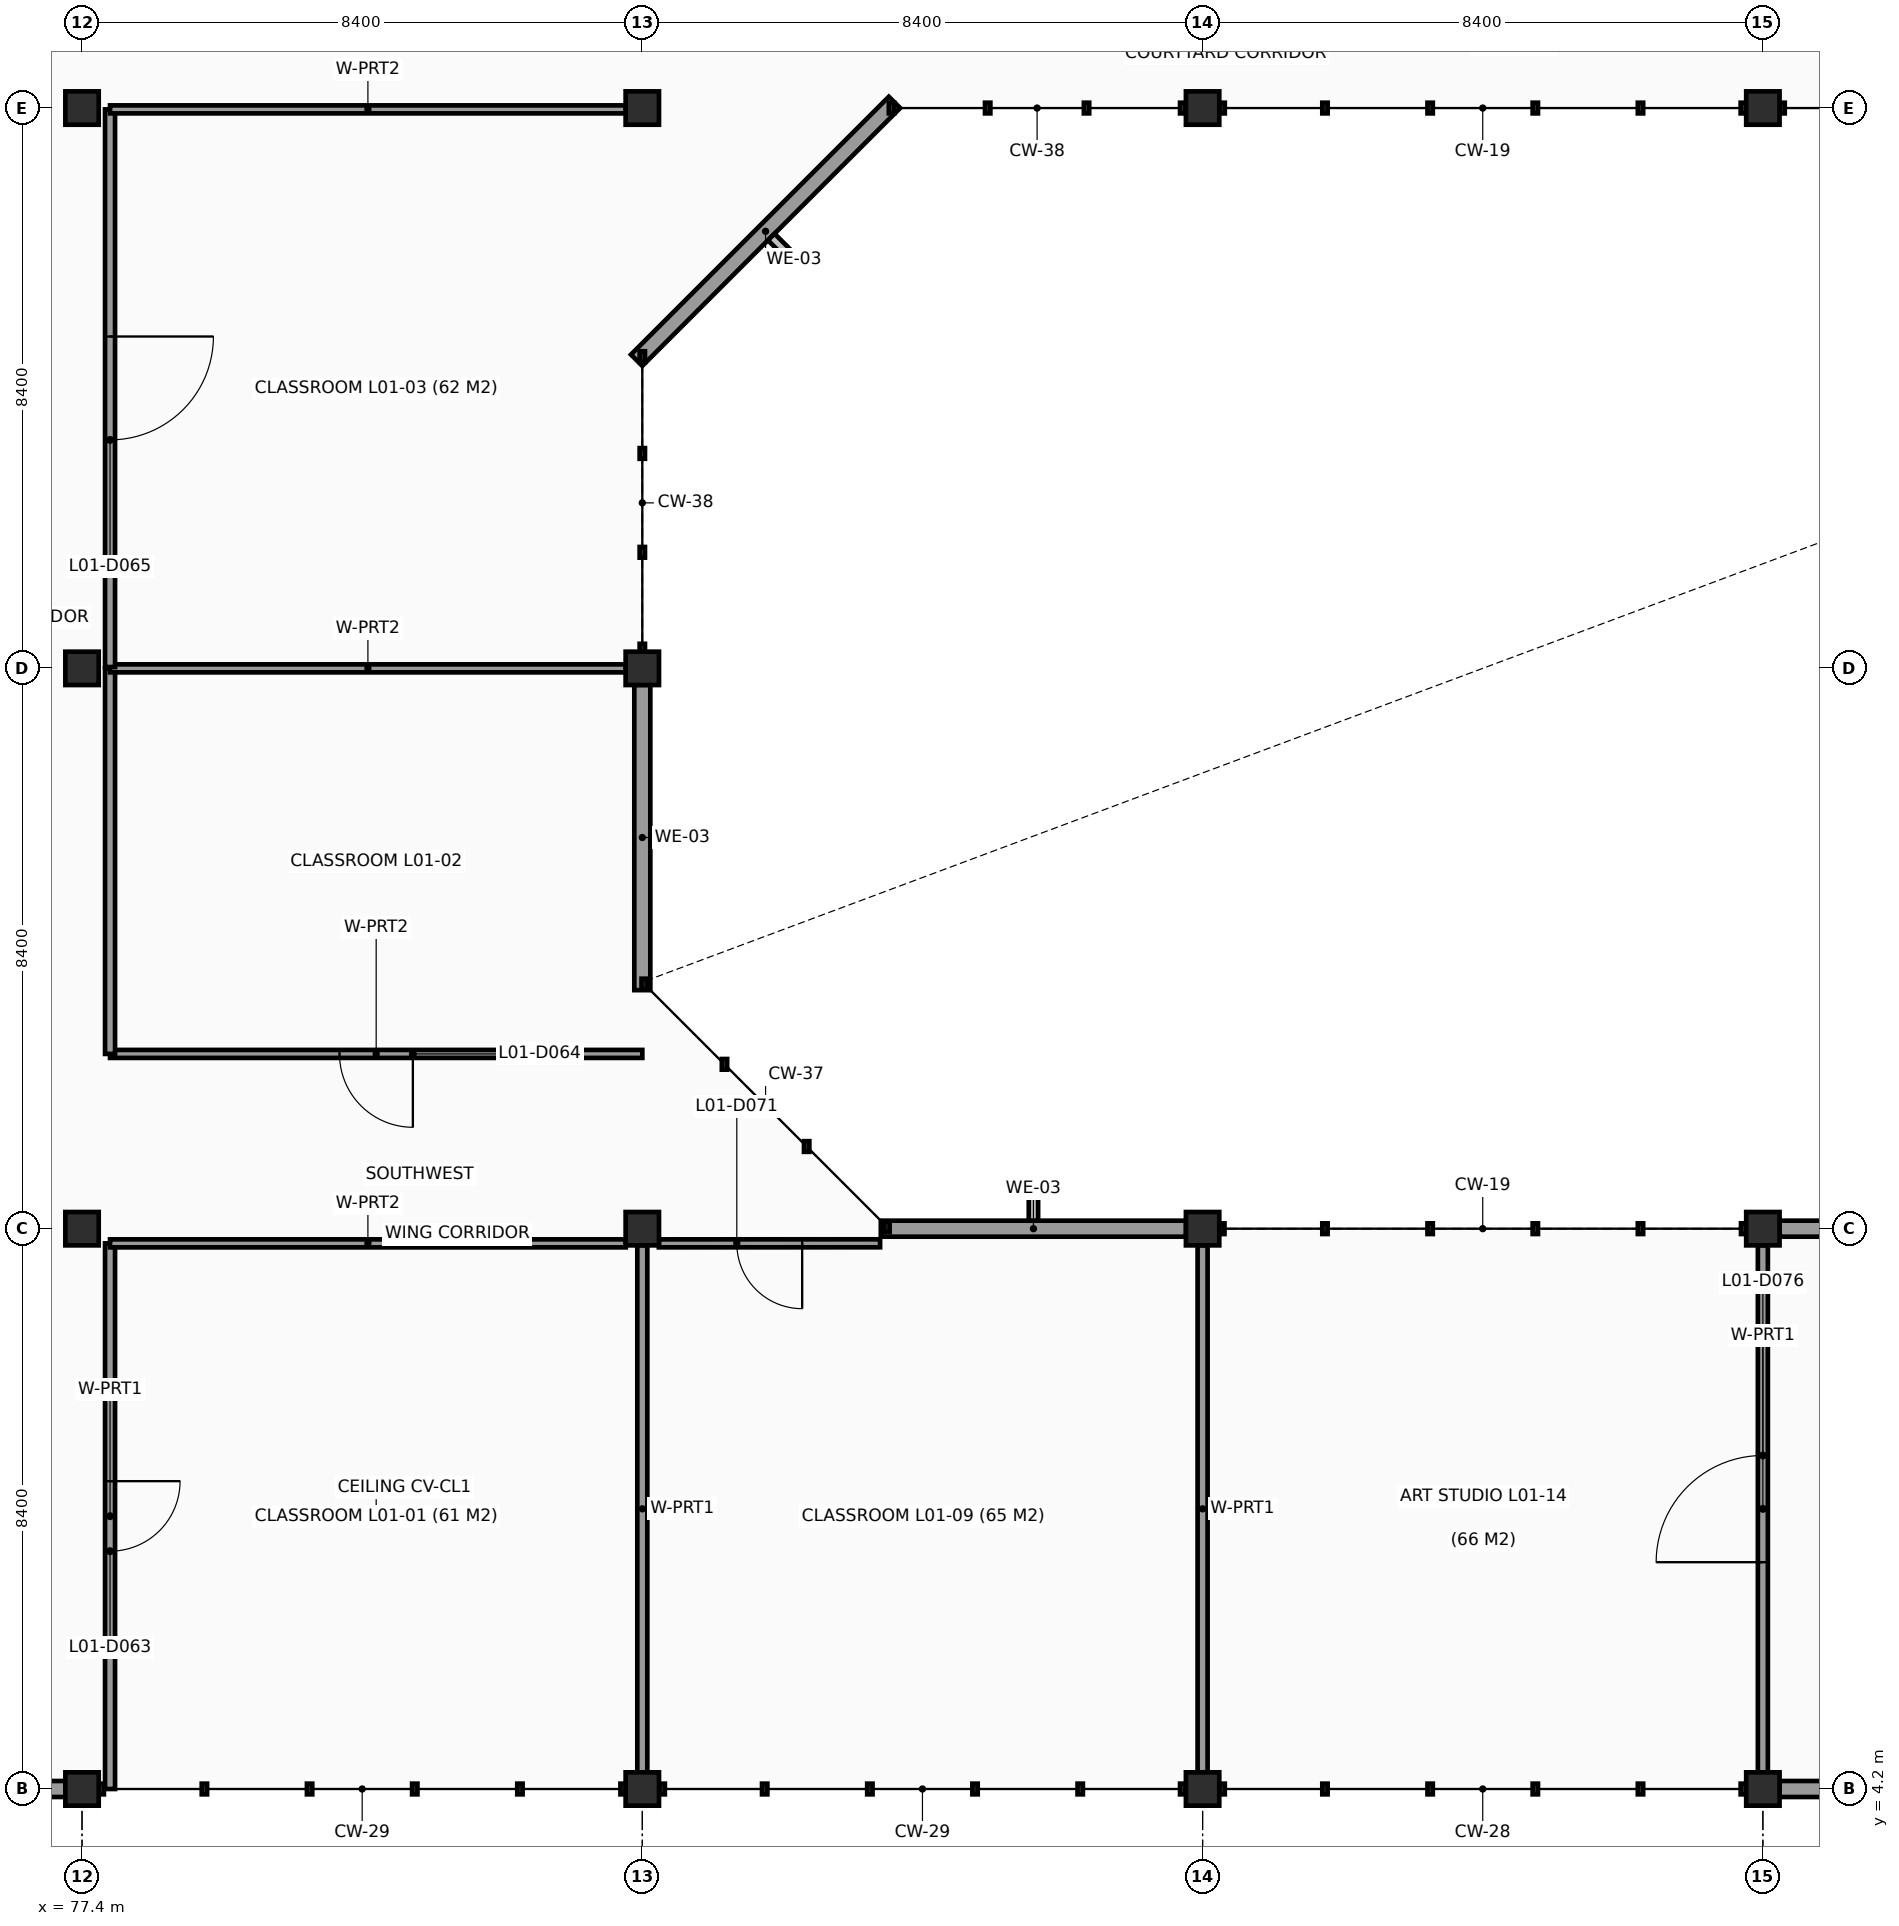
"""IFC4 building model, lengths in metres.
Left out: names, types, materials, properties, quantities, classifications, styles, units other than length and angle.
Written with IfcOpenShell. Run it as: python <this file> out.ifc"""

import sys

from ifc_helpers import new_model, si_unit, direction, frame, frame_2d, origin, origin_2d, place, context, subcontext, project, spatial, rectangle, extrude, element, fill, save


model = new_model("IFC4")
c1 = context("Model", 3, precision=1e-05, world=origin(), true_north=direction((0.0, 1.0)))
c2 = subcontext(c1, "Body", "Model", "MODEL_VIEW")
j1 = project(units=[si_unit("LENGTHUNIT", "METRE"), si_unit("PLANEANGLEUNIT", "RADIAN")], contexts=[c1])
p1 = place(None, origin())
s1 = spatial("IfcSite", under=j1, at=p1, CompositionType="ELEMENT")
p2 = place(p1, origin())
s2 = spatial("IfcBuilding", under=s1, at=p2, CompositionType="ELEMENT")
p3 = place(p2, frame((0.0, 0.0, 4.2)))
s3 = spatial("IfcBuildingStorey", under=s2, at=p3, CompositionType="ELEMENT", Elevation=4.2)
for number, where, z_axis, x_axis in (
    (1, (77.4, 4.2, 0.0), (0.0, 0.0, 1.0), (1.0, 0.0, 0.0)),
    (2, (77.4, 12.6, 0.0), (0.0, 0.0, 1.0), (1.0, 0.0, 0.0)),
    (3, (77.4, 21.0, 0.0), (0.0, 0.0, 1.0), (1.0, 0.0, 0.0)),
    (4, (77.4, 29.4, 0.0), (0.0, 0.0, 1.0), (1.0, 0.0, 0.0)),
    (5, (85.8, 4.2, 0.0), (0.0, 0.0, 1.0), (1.0, 0.0, 0.0)),
    (6, (85.8, 12.6, 0.0), (0.0, 0.0, 1.0), (1.0, 0.0, 0.0)),
    (7, (85.8, 21.0, 0.0), (0.0, 0.0, 1.0), (1.0, 0.0, 0.0)),
    (8, (85.8, 29.4, 0.0), (0.0, 0.0, 1.0), (1.0, 0.0, 0.0)),
    (9, (94.2, 4.2, 0.0), (0.0, 0.0, 1.0), (1.0, 0.0, 0.0)),
    (10, (94.2, 12.6, 0.0), (0.0, 0.0, 1.0), (1.0, 0.0, 0.0)),
    (11, (94.2, 29.4, 0.0), (0.0, 0.0, 1.0), (1.0, 0.0, 0.0)),
    (12, (102.6, 4.2, 0.0), (0.0, 0.0, 1.0), (1.0, 0.0, 0.0)),
    (13, (102.6, 12.6, 0.0), (0.0, 0.0, 1.0), (1.0, 0.0, 0.0)),
    (14, (102.6, 29.4, 0.0), (0.0, 0.0, 1.0), (1.0, 0.0, 0.0)),
):
    element("IfcColumn", number, at=place(p3, frame(where, z_axis=z_axis, x_axis=x_axis)), inside=s3, PredefinedType="COLUMN", context=c2, shape_type="SweptSolid", body=[
        extrude(rectangle(XDim=0.5, YDim=0.5, at=origin_2d()), origin(), (0.0, 0.0, 1.0), 3.6),
    ])
p4 = place(p3, frame((109.552, 4.2, 0.0), z_axis=(0.0, 0.0, 1.0), x_axis=(-1.0, 0.0, 0.0)))
e15 = element("IfcWall", 15, at=p4, inside=s3, PredefinedType="SOLIDWALL", context=c2, shape_type="SweptSolid", body=[
    extrude(rectangle(XDim=6.704, YDim=0.24, at=frame_2d((3.352, 0.0))), origin(), (0.0, 0.0, 1.0), 2.83),
])
p5 = place(p3, frame((77.152, 4.2, 0.0), z_axis=(0.0, 0.0, 1.0), x_axis=(-1.0, 0.0, 0.0)))
e16 = element("IfcWall", 16, at=p5, inside=s3, PredefinedType="SOLIDWALL", context=c2, shape_type="SweptSolid", body=[
    extrude(rectangle(XDim=2.504, YDim=0.24, at=frame_2d((1.252, 0.0))), origin(), (0.0, 0.0, 1.0), 2.77),
])
p6 = place(p5, frame((0.652, 0.0, 0.95)))
e17 = element("IfcOpeningElement", 17, at=p6, cuts=e16, PredefinedType="OPENING", context=c2, shape_type="SweptSolid", body=[
    extrude(rectangle(XDim=1.2, YDim=1.2, at=frame_2d((0.6, 0.6))), frame((0.0, 0.13, 0.0), z_axis=(0.0, -1.0, 0.0), x_axis=(1.0, 0.0, 0.0)), (0.0, 0.0, 1.0), 0.26),
])
p7 = place(p3, frame((89.376, 12.6, 0.0), z_axis=(0.0, 0.0, 1.0), x_axis=(1.0, 0.0, 0.0)))
e18 = element("IfcWall", 18, at=p7, inside=s3, PredefinedType="SOLIDWALL", context=c2, shape_type="SweptSolid", body=[
    extrude(rectangle(XDim=4.576, YDim=0.24, at=frame_2d((2.288, 0.0))), origin(), (0.0, 0.0, 1.0), 2.62),
])
p8 = place(p3, frame((102.848, 12.6, 0.0), z_axis=(0.0, 0.0, 1.0), x_axis=(1.0, 0.0, 0.0)))
e19 = element("IfcWall", 19, at=p8, inside=s3, PredefinedType="SOLIDWALL", context=c2, shape_type="SweptSolid", body=[
    extrude(rectangle(XDim=4.576, YDim=0.24, at=frame_2d((2.288, 0.0))), origin(), (0.0, 0.0, 1.0), 2.58),
])
p9 = place(p3, frame((89.581, 29.485, 0.0), z_axis=(0.0, 0.0, 1.0), x_axis=(-0.707106781187, -0.707106781187, 0.0)))
e20 = element("IfcWall", 20, at=p9, inside=s3, PredefinedType="SOLIDWALL", context=c2, shape_type="SweptSolid", body=[
    extrude(rectangle(XDim=5.467, YDim=0.24, at=frame_2d((2.733, 0.0))), origin(), (0.0, 0.0, 1.0), 2.58),
])
p10 = place(p3, frame((85.8, 20.752, 0.0), z_axis=(0.0, 0.0, 1.0), x_axis=(0.0, -1.0, 0.0)))
e21 = element("IfcWall", 21, at=p10, inside=s3, PredefinedType="SOLIDWALL", context=c2, shape_type="SweptSolid", body=[
    extrude(rectangle(XDim=4.576, YDim=0.24, at=frame_2d((2.288, 0.0))), origin(), (0.0, 0.0, 1.0), 2.58),
])
p11 = place(p3, frame((77.82, 4.2, 0.0), z_axis=(0.0, 0.0, 1.0), x_axis=(0.0, 1.0, 0.0)))
e22 = element("IfcWall", 22, at=p11, inside=s3, PredefinedType="PARTITIONING", context=c2, shape_type="SweptSolid", body=[
    extrude(rectangle(XDim=8.18, YDim=0.15, at=frame_2d((4.09, 0.0))), origin(), (0.0, 0.0, 1.0), 2.87),
])
p12 = place(p11, frame((3.565, 0.0, 0.0)))
e23 = element("IfcOpeningElement", 23, at=p12, cuts=e22, PredefinedType="OPENING", context=c2, shape_type="SweptSolid", body=[
    extrude(rectangle(XDim=1.05, YDim=2.15, at=frame_2d((0.525, 1.075))), frame((0.0, 0.085, 0.0), z_axis=(0.0, -1.0, 0.0), x_axis=(1.0, 0.0, 0.0)), (0.0, 0.0, 1.0), 0.17),
])
p13 = place(p3, frame((77.82, 12.38, 0.0), z_axis=(0.0, 0.0, 1.0), x_axis=(1.0, 0.0, 0.0)))
e24 = element("IfcWall", 24, at=p13, inside=s3, PredefinedType="PARTITIONING", context=c2, shape_type="SweptSolid", body=[
    extrude(rectangle(XDim=7.732, YDim=0.12, at=frame_2d((3.866, 0.0))), origin(), (0.0, 0.0, 1.0), 2.93),
])
p14 = place(p3, frame((85.8, 12.352, 0.0), z_axis=(0.0, 0.0, 1.0), x_axis=(0.0, -1.0, 0.0)))
e25 = element("IfcWall", 25, at=p14, inside=s3, PredefinedType="PARTITIONING", context=c2, shape_type="SweptSolid", body=[
    extrude(rectangle(XDim=7.904, YDim=0.15, at=frame_2d((3.952, 0.0))), origin(), (0.0, 0.0, 1.0), 2.92),
])
p15 = place(p3, frame((85.8, 15.22, 0.0), z_axis=(0.0, 0.0, 1.0), x_axis=(-1.0, 0.0, 0.0)))
e26 = element("IfcWall", 26, at=p15, inside=s3, PredefinedType="PARTITIONING", context=c2, shape_type="SweptSolid", body=[
    extrude(rectangle(XDim=7.98, YDim=0.12, at=frame_2d((3.99, 0.0))), origin(), (0.0, 0.0, 1.0), 2.58),
])
p16 = place(p15, frame((3.44, 0.0, 0.0)))
e27 = element("IfcOpeningElement", 27, at=p16, cuts=e26, PredefinedType="OPENING", context=c2, shape_type="SweptSolid", body=[
    extrude(rectangle(XDim=1.1, YDim=2.1, at=frame_2d((0.55, 1.05))), frame((0.0, 0.07, 0.0), z_axis=(0.0, -1.0, 0.0), x_axis=(1.0, 0.0, 0.0)), (0.0, 0.0, 1.0), 0.14),
])
p17 = place(p3, frame((77.82, 15.22, 0.0), z_axis=(0.0, 0.0, 1.0), x_axis=(0.0, 1.0, 0.0)))
e28 = element("IfcWall", 28, at=p17, inside=s3, PredefinedType="PARTITIONING", context=c2, shape_type="SweptSolid", body=[
    extrude(rectangle(XDim=5.78, YDim=0.15, at=frame_2d((2.89, 0.0))), origin(), (0.0, 0.0, 1.0), 2.53),
])
p18 = place(p3, frame((77.82, 21.0, 0.0), z_axis=(0.0, 0.0, 1.0), x_axis=(1.0, 0.0, 0.0)))
e29 = element("IfcWall", 29, at=p18, inside=s3, PredefinedType="PARTITIONING", context=c2, shape_type="SweptSolid", body=[
    extrude(rectangle(XDim=7.732, YDim=0.12, at=frame_2d((3.866, 0.0))), origin(), (0.0, 0.0, 1.0), 2.53),
])
p19 = place(p3, frame((77.82, 21.02, 0.0), z_axis=(0.0, 0.0, 1.0), x_axis=(0.0, 1.0, 0.0)))
e30 = element("IfcWall", 30, at=p19, inside=s3, PredefinedType="PARTITIONING", context=c2, shape_type="SweptSolid", body=[
    extrude(rectangle(XDim=8.36, YDim=0.15, at=frame_2d((4.18, 0.0))), origin(), (0.0, 0.0, 1.0), 2.53),
])
p20 = place(p19, frame((3.405, 0.0, 0.0)))
e31 = element("IfcOpeningElement", 31, at=p20, cuts=e30, PredefinedType="OPENING", context=c2, shape_type="SweptSolid", body=[
    extrude(rectangle(XDim=1.55, YDim=2.2, at=frame_2d((0.775, 1.1))), frame((0.0, 0.085, 0.0), z_axis=(0.0, -1.0, 0.0), x_axis=(1.0, 0.0, 0.0)), (0.0, 0.0, 1.0), 0.17),
])
p21 = place(p3, frame((77.82, 29.38, 0.0), z_axis=(0.0, 0.0, 1.0), x_axis=(1.0, 0.0, 0.0)))
e32 = element("IfcWall", 32, at=p21, inside=s3, PredefinedType="PARTITIONING", context=c2, shape_type="SweptSolid", body=[
    extrude(rectangle(XDim=7.732, YDim=0.12, at=frame_2d((3.866, 0.0))), origin(), (0.0, 0.0, 1.0), 2.63),
])
p22 = place(p3, frame((86.048, 12.38, 0.0), z_axis=(0.0, 0.0, 1.0), x_axis=(0.99999997562, 0.00022081554, 0.0)))
e33 = element("IfcWall", 33, at=p22, inside=s3, PredefinedType="PARTITIONING", context=c2, shape_type="SweptSolid", body=[
    extrude(rectangle(XDim=3.317, YDim=0.12, at=frame_2d((1.658, 0.0))), origin(), (0.0, 0.0, 1.0), 2.62),
])
p23 = place(p22, frame((1.168, 0.0, 0.0)))
e34 = element("IfcOpeningElement", 34, at=p23, cuts=e33, PredefinedType="OPENING", context=c2, shape_type="SweptSolid", body=[
    extrude(rectangle(XDim=0.98, YDim=2.12, at=frame_2d((0.49, 1.06))), frame((0.0, 0.07, 0.0), z_axis=(0.0, -1.0, 0.0), x_axis=(1.0, 0.0, 0.0)), (0.0, 0.0, 1.0), 0.14),
])
p24 = place(p3, frame((94.2, 12.352, 0.0), z_axis=(0.0, 0.0, 1.0), x_axis=(0.0, -1.0, 0.0)))
e35 = element("IfcWall", 35, at=p24, inside=s3, PredefinedType="PARTITIONING", context=c2, shape_type="SweptSolid", body=[
    extrude(rectangle(XDim=7.904, YDim=0.15, at=frame_2d((3.952, 0.0))), origin(), (0.0, 0.0, 1.0), 2.96),
])
p25 = place(p3, frame((102.6, 12.352, 0.0), z_axis=(0.0, 0.0, 1.0), x_axis=(0.0, -1.0, 0.0)))
e36 = element("IfcWall", 36, at=p25, inside=s3, PredefinedType="PARTITIONING", context=c2, shape_type="SweptSolid", body=[
    extrude(rectangle(XDim=7.904, YDim=0.15, at=frame_2d((3.952, 0.0))), origin(), (0.0, 0.0, 1.0), 2.63),
])
p26 = place(p25, frame((3.152, 0.0, 0.0)))
e37 = element("IfcOpeningElement", 37, at=p26, cuts=e36, PredefinedType="OPENING", context=c2, shape_type="SweptSolid", body=[
    extrude(rectangle(XDim=1.6, YDim=2.2, at=frame_2d((0.8, 1.1))), frame((0.0, 0.085, 0.0), z_axis=(0.0, -1.0, 0.0), x_axis=(1.0, 0.0, 0.0)), (0.0, 0.0, 1.0), 0.17),
])
p27 = place(p12, origin())
e38 = element("IfcDoor", 38, at=p27, inside=s3, OperationType="SINGLE_SWING_RIGHT", PredefinedType="DOOR", context=c2, shape_type="SweptSolid", body=[
    extrude(rectangle(XDim=1.05, YDim=2.15, at=frame_2d((0.525, 1.075))), frame((0.0, 0.025, 0.0), z_axis=(0.0, -1.0, 0.0), x_axis=(1.0, 0.0, 0.0)), (0.0, 0.0, 1.0), 0.05),
])
fill(e23, e38)
p28 = place(p16, origin())
e39 = element("IfcDoor", 39, at=p28, inside=s3, OperationType="SINGLE_SWING_LEFT", PredefinedType="DOOR", context=c2, shape_type="SweptSolid", body=[
    extrude(rectangle(XDim=1.1, YDim=2.1, at=frame_2d((0.55, 1.05))), frame((0.0, 0.025, 0.0), z_axis=(0.0, -1.0, 0.0), x_axis=(1.0, 0.0, 0.0)), (0.0, 0.0, 1.0), 0.05),
])
fill(e27, e39)
p29 = place(p20, origin())
e40 = element("IfcDoor", 40, at=p29, inside=s3, OperationType="DOUBLE_DOOR_SINGLE_SWING", PredefinedType="DOOR", context=c2, shape_type="SweptSolid", body=[
    extrude(rectangle(XDim=1.55, YDim=2.2, at=frame_2d((0.775, 1.1))), frame((0.0, 0.025, 0.0), z_axis=(0.0, -1.0, 0.0), x_axis=(1.0, 0.0, 0.0)), (0.0, 0.0, 1.0), 0.05),
])
fill(e31, e40)
p30 = place(p23, origin())
e41 = element("IfcDoor", 41, at=p30, inside=s3, OperationType="SINGLE_SWING_RIGHT", PredefinedType="DOOR", context=c2, shape_type="SweptSolid", body=[
    extrude(rectangle(XDim=0.98, YDim=2.12, at=frame_2d((0.49, 1.06))), frame((0.0, 0.025, 0.0), z_axis=(0.0, -1.0, 0.0), x_axis=(1.0, 0.0, 0.0)), (0.0, 0.0, 1.0), 0.05),
])
fill(e34, e41)
p31 = place(p26, origin())
e42 = element("IfcDoor", 42, at=p31, inside=s3, OperationType="DOUBLE_DOOR_SINGLE_SWING", PredefinedType="DOOR", context=c2, shape_type="SweptSolid", body=[
    extrude(rectangle(XDim=1.6, YDim=2.2, at=frame_2d((0.8, 1.1))), frame((0.0, 0.025, 0.0), z_axis=(0.0, -1.0, 0.0), x_axis=(1.0, 0.0, 0.0)), (0.0, 0.0, 1.0), 0.05),
])
fill(e37, e42)
save(model, sys.argv[1])
